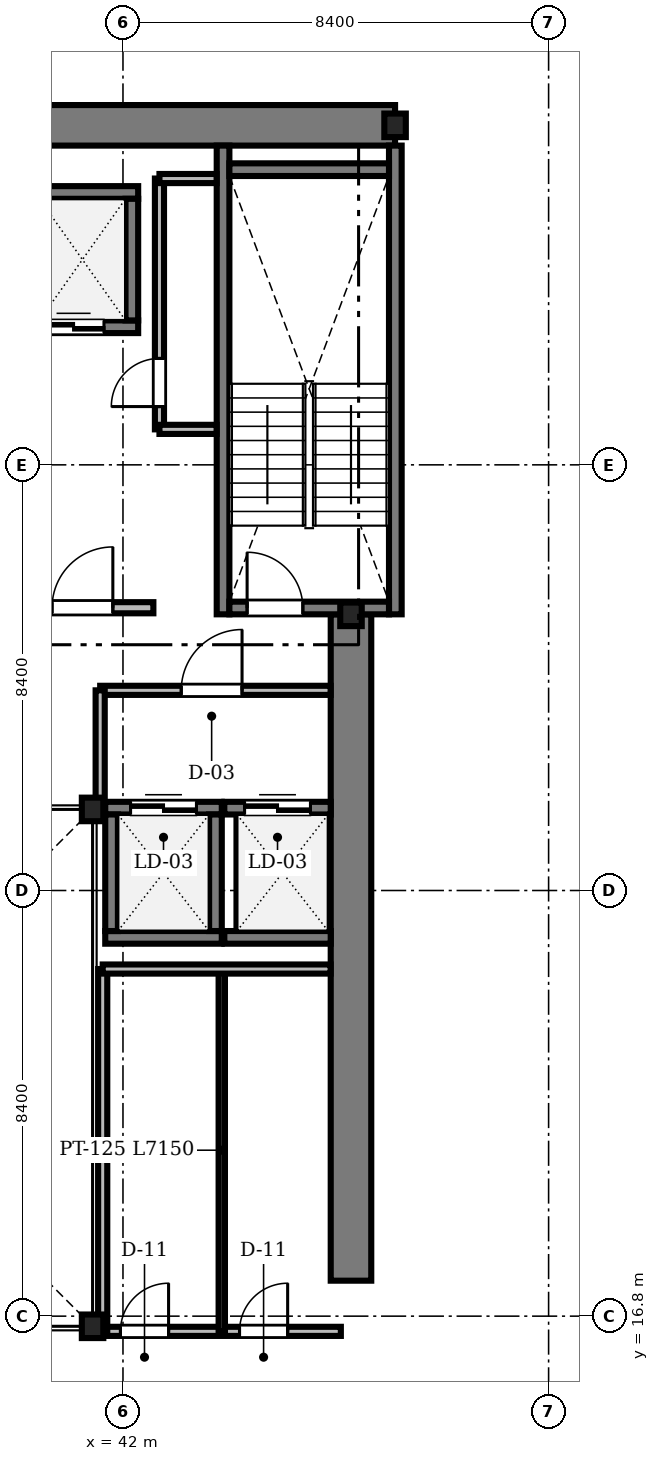
"""IFC4 building model, lengths in metres.
Left out: names, types, materials, properties, quantities, classifications, styles, units other than length and angle.
Written with IfcOpenShell. Run it as: python <this file> out.ifc"""

import sys

from ifc_helpers import new_model, si_unit, direction, frame, frame_2d, origin, origin_2d, place, context, subcontext, project, spatial, rectangle, i_section, extrude, source, transform, mapped, element, fill, save


model = new_model("IFC4")
c1 = context("Model", 3, precision=1e-05, world=origin(), true_north=direction((0.0, 1.0)))
c2 = subcontext(c1, "Body", "Model", "MODEL_VIEW")
j1 = project(units=[si_unit("LENGTHUNIT", "METRE"), si_unit("PLANEANGLEUNIT", "RADIAN")], contexts=[c1])
p1 = place(None, origin())
s1 = spatial("IfcSite", under=j1, at=p1, CompositionType="ELEMENT")
p2 = place(p1, origin())
s2 = spatial("IfcBuilding", under=s1, at=p2, CompositionType="ELEMENT")
p3 = place(p2, frame((0.0, 0.0, 122.4)))
s3 = spatial("IfcBuildingStorey", under=s2, at=p3, CompositionType="ELEMENT", Elevation=122.4)
m1 = source(origin(), c2, "Body", "SweptSolid", [
    extrude(rectangle(XDim=17.52, YDim=0.8, at=frame_2d((8.76, 0.0))), origin(), (0.0, 0.0, 1.0), 3.46),
])
p4 = place(p3, frame((29.85, 40.3, 0.0), z_axis=(0.0, 0.0, 1.0), x_axis=(1.0, 0.0, 0.0)))
e1 = element("IfcWall", 1, at=p4, inside=s3, PredefinedType="SHEAR", context=c2, shape_type="MappedRepresentation", body=[
    mapped(m1, transform((0.0, 0.0, 0.0), scale=1.0)),
])
m2 = source(origin(), c2, "Body", "SweptSolid", [
    extrude(rectangle(XDim=13.15, YDim=0.8, at=frame_2d((6.575, 0.0))), origin(), (0.0, 0.0, 1.0), 3.46),
])
p5 = place(p3, frame((46.5, 17.5, 0.0), z_axis=(0.0, 0.0, 1.0), x_axis=(0.0, 1.0, 0.0)))
e2 = element("IfcWall", 2, at=p5, inside=s3, PredefinedType="SHEAR", context=c2, shape_type="MappedRepresentation", body=[
    mapped(m2, transform((0.0, 0.0, 0.0), scale=1.0)),
])
m3 = source(origin(), c2, "Body", "SweptSolid", [
    extrude(i_section(OverallWidth=0.424, OverallDepth=0.465, WebThickness=0.035, FlangeThickness=0.056, FilletRadius=0.015, at=origin_2d()), origin(), (0.0, 0.0, 1.0), 3.46),
])
for number, where, z_axis, x_axis in (
    (3, (41.4, 16.6, 0.0), (0.0, 0.0, 1.0), (1.0, 0.0, 0.0)),
    (4, (41.4, 26.8, 0.0), (0.0, 0.0, 1.0), (1.0, 0.0, 0.0)),
    (5, (46.5, 30.65, 0.0), (0.0, 0.0, 1.0), (1.0, 0.0, 0.0)),
    (6, (47.37, 40.3, 0.0), (0.0, 0.0, 1.0), (1.0, 0.0, 0.0)),
):
    element("IfcColumn", number, at=place(p3, frame(where, z_axis=z_axis, x_axis=x_axis)), inside=s3, PredefinedType="COLUMN", context=c2, shape_type="MappedRepresentation", body=[
        mapped(m3, transform((0.0, 0.0, 0.0), scale=1.0)),
    ])
m4 = source(origin(), c2, "Body", "SweptSolid", [
    extrude(rectangle(XDim=9.25, YDim=0.25, at=frame_2d((4.625, 0.0))), origin(), (0.0, 0.0, 1.0), 3.5),
])
for number, where, z_axis, x_axis in (
    (7, (43.975, 30.65, 0.0), (0.0, 0.0, 1.0), (0.0, 1.0, 0.0)),
    (8, (47.375, 30.65, 0.0), (0.0, 0.0, 1.0), (0.0, 1.0, 0.0)),
):
    element("IfcWall", number, at=place(p3, frame(where, z_axis=z_axis, x_axis=x_axis)), inside=s3, PredefinedType="SOLIDWALL", context=c2, shape_type="MappedRepresentation", body=[
        mapped(m4, transform((0.0, 0.0, 0.0), scale=1.0)),
    ])
m5 = source(origin(), c2, "Body", "SweptSolid", [
    extrude(rectangle(XDim=3.15, YDim=0.25, at=frame_2d((1.575, 0.0))), origin(), (0.0, 0.0, 1.0), 3.5),
])
p6 = place(p3, frame((44.1, 39.425, 0.0), z_axis=(0.0, 0.0, 1.0), x_axis=(1.0, 0.0, 0.0)))
e9 = element("IfcWall", 9, at=p6, inside=s3, PredefinedType="SOLIDWALL", context=c2, shape_type="MappedRepresentation", body=[
    mapped(m5, transform((0.0, 0.0, 0.0), scale=1.0)),
])
p7 = place(p3, frame((44.1, 30.775, 0.0), z_axis=(0.0, 0.0, 1.0), x_axis=(1.0, 0.0, 0.0)))
e10 = element("IfcWall", 10, at=p7, inside=s3, PredefinedType="SOLIDWALL", context=c2, shape_type="MappedRepresentation", body=[
    mapped(m5, transform((0.0, 0.0, 0.0), scale=1.0)),
])
m6 = source(origin(), c2, "Body", "SweptSolid", [
    extrude(rectangle(XDim=1.1, YDim=2.2, at=frame_2d((0.55, 1.1))), frame((0.0, 0.135, 0.0), z_axis=(0.0, -1.0, 0.0), x_axis=(1.0, 0.0, 0.0)), (0.0, 0.0, 1.0), 0.27),
])
p8 = place(p7, frame((0.35, 0.0, 0.0)))
e11 = element("IfcOpeningElement", 11, at=p8, cuts=e10, PredefinedType="OPENING", context=c2, shape_type="MappedRepresentation", body=[
    mapped(m6, transform((0.0, 0.0, 0.0), scale=1.0)),
])
m7 = source(origin(), c2, "Body", "SweptSolid", [
    extrude(rectangle(XDim=2.8, YDim=0.22, at=frame_2d((1.4, 0.0))), origin(), (0.0, 0.0, 1.0), 3.46),
])
p9 = place(p3, frame((39.8, 30.78, 0.0), z_axis=(0.0, 0.0, 1.0), x_axis=(1.0, 0.0, 0.0)))
e12 = element("IfcWall", 12, at=p9, inside=s3, PredefinedType="SOLIDWALL", context=c2, shape_type="MappedRepresentation", body=[
    mapped(m7, transform((0.0, 0.0, 0.0), scale=1.0)),
])
m8 = source(origin(), c2, "Body", "SweptSolid", [
    extrude(rectangle(XDim=1.2, YDim=2.2, at=frame_2d((0.6, 1.1))), frame((0.0, 0.12, 0.0), z_axis=(0.0, -1.0, 0.0), x_axis=(1.0, 0.0, 0.0)), (0.0, 0.0, 1.0), 0.24),
])
p10 = place(p9, frame((0.8, 0.0, 0.0)))
e13 = element("IfcOpeningElement", 13, at=p10, cuts=e12, PredefinedType="OPENING", context=c2, shape_type="MappedRepresentation", body=[
    mapped(m8, transform((0.0, 0.0, 0.0), scale=1.0)),
])
m9 = source(origin(), c2, "Body", "SweptSolid", [
    extrude(rectangle(XDim=2.55, YDim=0.25, at=frame_2d((1.275, 0.0))), origin(), (0.0, 0.0, 1.0), 3.46),
])
p11 = place(p3, frame((39.75, 36.325, 0.0), z_axis=(0.0, 0.0, 1.0), x_axis=(1.0, 0.0, 0.0)))
e14 = element("IfcWall", 14, at=p11, inside=s3, PredefinedType="SOLIDWALL", context=c2, shape_type="MappedRepresentation", body=[
    mapped(m9, transform((0.0, 0.0, 0.0), scale=1.0)),
])
m10 = source(origin(), c2, "Body", "SweptSolid", [
    extrude(rectangle(XDim=1.2, YDim=2.25, at=frame_2d((0.6, 1.125))), frame((0.0, 0.135, 0.0), z_axis=(0.0, -1.0, 0.0), x_axis=(1.0, 0.0, 0.0)), (0.0, 0.0, 1.0), 0.27),
])
p12 = place(p11, frame((0.675, 0.0, 0.0)))
e15 = element("IfcOpeningElement", 15, at=p12, cuts=e14, PredefinedType="OPENING", context=c2, shape_type="MappedRepresentation", body=[
    mapped(m10, transform((0.0, 0.0, 0.0), scale=1.0)),
])
p13 = place(p3, frame((39.75, 38.975, 0.0), z_axis=(0.0, 0.0, 1.0), x_axis=(1.0, 0.0, 0.0)))
e16 = element("IfcWall", 16, at=p13, inside=s3, PredefinedType="SOLIDWALL", context=c2, shape_type="MappedRepresentation", body=[
    mapped(m9, transform((0.0, 0.0, 0.0), scale=1.0)),
])
m11 = source(origin(), c2, "Body", "SweptSolid", [
    extrude(rectangle(XDim=2.4, YDim=0.25, at=frame_2d((1.2, 0.0))), origin(), (0.0, 0.0, 1.0), 3.46),
])
p14 = place(p3, frame((42.175, 36.45, 0.0), z_axis=(0.0, 0.0, 1.0), x_axis=(0.0, 1.0, 0.0)))
e17 = element("IfcWall", 17, at=p14, inside=s3, PredefinedType="SOLIDWALL", context=c2, shape_type="MappedRepresentation", body=[
    mapped(m11, transform((0.0, 0.0, 0.0), scale=1.0)),
])
m12 = source(origin(), c2, "Body", "SweptSolid", [
    extrude(rectangle(XDim=2.3, YDim=0.25, at=frame_2d((1.15, 0.0))), origin(), (0.0, 0.0, 1.0), 3.46),
])
p15 = place(p3, frame((41.65, 24.275, 0.0), z_axis=(0.0, 0.0, 1.0), x_axis=(1.0, 0.0, 0.0)))
e18 = element("IfcWall", 18, at=p15, inside=s3, PredefinedType="SOLIDWALL", context=c2, shape_type="MappedRepresentation", body=[
    mapped(m12, transform((0.0, 0.0, 0.0), scale=1.0)),
])
p16 = place(p3, frame((41.65, 26.825, 0.0), z_axis=(0.0, 0.0, 1.0), x_axis=(1.0, 0.0, 0.0)))
e19 = element("IfcWall", 19, at=p16, inside=s3, PredefinedType="SOLIDWALL", context=c2, shape_type="MappedRepresentation", body=[
    mapped(m12, transform((0.0, 0.0, 0.0), scale=1.0)),
])
m13 = source(origin(), c2, "Body", "SweptSolid", [
    extrude(rectangle(XDim=1.3, YDim=2.3, at=frame_2d((0.65, 1.15))), frame((0.0, 0.135, 0.0), z_axis=(0.0, -1.0, 0.0), x_axis=(1.0, 0.0, 0.0)), (0.0, 0.0, 1.0), 0.27),
])
p17 = place(p16, frame((0.5, 0.0, 0.0)))
e20 = element("IfcOpeningElement", 20, at=p17, cuts=e19, PredefinedType="OPENING", context=c2, shape_type="MappedRepresentation", body=[
    mapped(m13, transform((0.0, 0.0, 0.0), scale=1.0)),
])
for number, where, z_axis, x_axis in (
    (21, (41.775, 24.4, 0.0), (0.0, 0.0, 1.0), (0.0, 1.0, 0.0)),
    (22, (43.825, 24.4, 0.0), (0.0, 0.0, 1.0), (0.0, 1.0, 0.0)),
):
    element("IfcWall", number, at=place(p3, frame(where, z_axis=z_axis, x_axis=x_axis)), inside=s3, PredefinedType="SOLIDWALL", context=c2, shape_type="MappedRepresentation", body=[
        mapped(m12, transform((0.0, 0.0, 0.0), scale=1.0)),
    ])
m14 = source(origin(), c2, "Body", "SweptSolid", [
    extrude(rectangle(XDim=2.1, YDim=0.25, at=frame_2d((1.05, 0.0))), origin(), (0.0, 0.0, 1.0), 3.46),
])
p18 = place(p3, frame((44.0, 24.275, 0.0), z_axis=(0.0, 0.0, 1.0), x_axis=(1.0, 0.0, 0.0)))
e23 = element("IfcWall", 23, at=p18, inside=s3, PredefinedType="SOLIDWALL", context=c2, shape_type="MappedRepresentation", body=[
    mapped(m14, transform((0.0, 0.0, 0.0), scale=1.0)),
])
p19 = place(p3, frame((44.0, 26.825, 0.0), z_axis=(0.0, 0.0, 1.0), x_axis=(1.0, 0.0, 0.0)))
e24 = element("IfcWall", 24, at=p19, inside=s3, PredefinedType="SOLIDWALL", context=c2, shape_type="MappedRepresentation", body=[
    mapped(m14, transform((0.0, 0.0, 0.0), scale=1.0)),
])
p20 = place(p19, frame((0.4, 0.0, 0.0)))
e25 = element("IfcOpeningElement", 25, at=p20, cuts=e24, PredefinedType="OPENING", context=c2, shape_type="MappedRepresentation", body=[
    mapped(m13, transform((0.0, 0.0, 0.0), scale=1.0)),
])
m15 = source(origin(), c2, "Body", "SweptSolid", [
    extrude(rectangle(XDim=4.95, YDim=0.18, at=frame_2d((2.475, 0.0))), origin(), (0.0, 0.0, 1.0), 3.46),
])
p21 = place(p3, frame((42.72, 34.3, 0.0), z_axis=(0.0, 0.0, 1.0), x_axis=(0.0, 1.0, 0.0)))
e26 = element("IfcWall", 26, at=p21, inside=s3, PredefinedType="PARTITIONING", context=c2, shape_type="MappedRepresentation", body=[
    mapped(m15, transform((0.0, 0.0, 0.0), scale=1.0)),
])
m16 = source(origin(), c2, "Body", "SweptSolid", [
    extrude(rectangle(XDim=0.95, YDim=2.15, at=frame_2d((0.475, 1.075))), frame((0.0, 0.1, 0.0), z_axis=(0.0, -1.0, 0.0), x_axis=(1.0, 0.0, 0.0)), (0.0, 0.0, 1.0), 0.2),
])
p22 = place(p21, frame((0.45, 0.0, 0.0)))
e27 = element("IfcOpeningElement", 27, at=p22, cuts=e26, PredefinedType="OPENING", context=c2, shape_type="MappedRepresentation", body=[
    mapped(m16, transform((0.0, 0.0, 0.0), scale=1.0)),
])
m17 = source(origin(), c2, "Body", "SweptSolid", [
    extrude(rectangle(XDim=4.548, YDim=0.18, at=frame_2d((2.274, 0.0))), origin(), (0.0, 0.0, 1.0), 3.092),
])
p23 = place(p3, frame((41.55, 29.15, 0.0), z_axis=(0.0, 0.0, 1.0), x_axis=(1.0, 0.0, 0.0)))
e28 = element("IfcWall", 28, at=p23, inside=s3, PredefinedType="PARTITIONING", context=c2, shape_type="MappedRepresentation", body=[
    mapped(m17, transform((0.0, 0.0, 0.0), scale=1.0)),
])
m18 = source(origin(), c2, "Body", "SweptSolid", [
    extrude(rectangle(XDim=1.2, YDim=2.2, at=frame_2d((0.6, 1.1))), frame((0.0, 0.1, 0.0), z_axis=(0.0, -1.0, 0.0), x_axis=(1.0, 0.0, 0.0)), (0.0, 0.0, 1.0), 0.2),
])
p24 = place(p23, frame((1.6, 0.0, 0.0)))
e29 = element("IfcOpeningElement", 29, at=p24, cuts=e28, PredefinedType="OPENING", context=c2, shape_type="MappedRepresentation", body=[
    mapped(m18, transform((0.0, 0.0, 0.0), scale=1.0)),
])
m19 = source(origin(), c2, "Body", "SweptSolid", [
    extrude(rectangle(XDim=4.7, YDim=0.18, at=frame_2d((2.35, 0.0))), origin(), (0.0, 0.0, 1.0), 2.852),
])
p25 = place(p3, frame((41.6, 16.5, 0.0), z_axis=(0.0, 0.0, 1.0), x_axis=(1.0, 0.0, 0.0)))
e30 = element("IfcWall", 30, at=p25, inside=s3, PredefinedType="PARTITIONING", context=c2, shape_type="MappedRepresentation", body=[
    mapped(m19, transform((0.0, 0.0, 0.0), scale=1.0)),
])
p26 = place(p25, frame((0.35, 0.0, 0.0)))
e31 = element("IfcOpeningElement", 31, at=p26, cuts=e30, PredefinedType="OPENING", context=c2, shape_type="MappedRepresentation", body=[
    mapped(m16, transform((0.0, 0.0, 0.0), scale=1.0)),
])
p27 = place(p25, frame((2.7, 0.0, 0.0)))
e32 = element("IfcOpeningElement", 32, at=p27, cuts=e30, PredefinedType="OPENING", context=c2, shape_type="MappedRepresentation", body=[
    mapped(m16, transform((0.0, 0.0, 0.0), scale=1.0)),
])
m20 = source(origin(), c2, "Body", "SweptSolid", [
    extrude(rectangle(XDim=7.15, YDim=0.18, at=frame_2d((3.575, 0.0))), origin(), (0.0, 0.0, 1.0), 2.852),
])
p28 = place(p3, frame((41.6, 16.5, 0.0), z_axis=(0.0, 0.0, 1.0), x_axis=(0.0, 1.0, 0.0)))
e33 = element("IfcWall", 33, at=p28, inside=s3, PredefinedType="PARTITIONING", context=c2, shape_type="MappedRepresentation", body=[
    mapped(m20, transform((0.0, 0.0, 0.0), scale=1.0)),
])
m21 = source(origin(), c2, "Body", "SweptSolid", [
    extrude(rectangle(XDim=7.15, YDim=0.125, at=frame_2d((3.575, 0.0))), origin(), (0.0, 0.0, 1.0), 2.852),
])
p29 = place(p3, frame((43.95, 16.5, 0.0), z_axis=(0.0, 0.0, 1.0), x_axis=(0.0, 1.0, 0.0)))
e34 = element("IfcWall", 34, at=p29, inside=s3, PredefinedType="PARTITIONING", context=c2, shape_type="MappedRepresentation", body=[
    mapped(m21, transform((0.0, 0.0, 0.0), scale=1.0)),
])
m22 = source(origin(), c2, "Body", "SweptSolid", [
    extrude(rectangle(XDim=4.498, YDim=0.18, at=frame_2d((2.249, 0.0))), origin(), (0.0, 0.0, 1.0), 3.46),
])
p30 = place(p3, frame((41.6, 23.65, 0.0), z_axis=(0.0, 0.0, 1.0), x_axis=(1.0, 0.0, 0.0)))
e35 = element("IfcWall", 35, at=p30, inside=s3, PredefinedType="PARTITIONING", context=c2, shape_type="MappedRepresentation", body=[
    mapped(m22, transform((0.0, 0.0, 0.0), scale=1.0)),
])
m23 = source(origin(), c2, "Body", "SweptSolid", [
    extrude(rectangle(XDim=2.35, YDim=0.18, at=frame_2d((1.175, 0.0))), origin(), (0.0, 0.0, 1.0), 2.852),
])
p31 = place(p3, frame((41.55, 26.8, 0.0), z_axis=(0.0, 0.0, 1.0), x_axis=(0.0, 1.0, 0.0)))
e36 = element("IfcWall", 36, at=p31, inside=s3, PredefinedType="PARTITIONING", context=c2, shape_type="MappedRepresentation", body=[
    mapped(m23, transform((0.0, 0.0, 0.0), scale=1.0)),
])
m24 = source(origin(), c2, "Body", "SweptSolid", [
    extrude(rectangle(XDim=1.128, YDim=0.18, at=frame_2d((0.564, 0.0))), origin(), (0.0, 0.0, 1.0), 3.46),
])
for number, where, z_axis, x_axis in (
    (37, (42.72, 34.3, 0.0), (0.0, 0.0, 1.0), (1.0, 0.0, 0.0)),
    (38, (42.72, 39.25, 0.0), (0.0, 0.0, 1.0), (1.0, 0.0, 0.0)),
):
    element("IfcWall", number, at=place(p3, frame(where, z_axis=z_axis, x_axis=x_axis)), inside=s3, PredefinedType="PARTITIONING", context=c2, shape_type="MappedRepresentation", body=[
        mapped(m24, transform((0.0, 0.0, 0.0), scale=1.0)),
    ])
m25 = source(origin(), c2, "Body", "SweptSolid", [
    extrude(rectangle(XDim=1.1, YDim=2.2, at=frame_2d((0.55, 1.1))), frame((0.0, 0.025, 0.0), z_axis=(0.0, -1.0, 0.0), x_axis=(1.0, 0.0, 0.0)), (0.0, 0.0, 1.0), 0.05),
])
p32 = place(p8, origin())
e39 = element("IfcDoor", 39, at=p32, inside=s3, OperationType="SINGLE_SWING_LEFT", PredefinedType="DOOR", context=c2, shape_type="MappedRepresentation", body=[
    mapped(m25, transform((0.0, 0.0, 0.0), scale=1.0)),
])
fill(e11, e39)
m26 = source(origin(), c2, "Body", "SweptSolid", [
    extrude(rectangle(XDim=1.2, YDim=2.2, at=frame_2d((0.6, 1.1))), frame((0.0, 0.025, 0.0), z_axis=(0.0, -1.0, 0.0), x_axis=(1.0, 0.0, 0.0)), (0.0, 0.0, 1.0), 0.05),
])
p33 = place(p10, origin())
e40 = element("IfcDoor", 40, at=p33, inside=s3, OperationType="SINGLE_SWING_RIGHT", PredefinedType="DOOR", context=c2, shape_type="MappedRepresentation", body=[
    mapped(m26, transform((0.0, 0.0, 0.0), scale=1.0)),
])
fill(e13, e40)
m27 = source(origin(), c2, "Body", "SweptSolid", [
    extrude(rectangle(XDim=1.2, YDim=2.25, at=frame_2d((0.6, 1.125))), frame((0.0, 0.025, 0.0), z_axis=(0.0, -1.0, 0.0), x_axis=(1.0, 0.0, 0.0)), (0.0, 0.0, 1.0), 0.05),
])
p34 = place(p12, origin())
e41 = element("IfcDoor", 41, at=p34, inside=s3, OperationType="DOUBLE_DOOR_SLIDING", PredefinedType="DOOR", context=c2, shape_type="MappedRepresentation", body=[
    mapped(m27, transform((0.0, 0.0, 0.0), scale=1.0)),
])
fill(e15, e41)
m28 = source(origin(), c2, "Body", "SweptSolid", [
    extrude(rectangle(XDim=1.3, YDim=2.3, at=frame_2d((0.65, 1.15))), frame((0.0, 0.025, 0.0), z_axis=(0.0, -1.0, 0.0), x_axis=(1.0, 0.0, 0.0)), (0.0, 0.0, 1.0), 0.05),
])
p35 = place(p17, origin())
e42 = element("IfcDoor", 42, at=p35, inside=s3, OperationType="DOUBLE_DOOR_SLIDING", PredefinedType="DOOR", context=c2, shape_type="MappedRepresentation", body=[
    mapped(m28, transform((0.0, 0.0, 0.0), scale=1.0)),
])
fill(e20, e42)
p36 = place(p20, origin())
e43 = element("IfcDoor", 43, at=p36, inside=s3, OperationType="DOUBLE_DOOR_SLIDING", PredefinedType="DOOR", context=c2, shape_type="MappedRepresentation", body=[
    mapped(m28, transform((0.0, 0.0, 0.0), scale=1.0)),
])
fill(e25, e43)
m29 = source(origin(), c2, "Body", "SweptSolid", [
    extrude(rectangle(XDim=0.95, YDim=2.15, at=frame_2d((0.475, 1.075))), frame((0.0, 0.025, 0.0), z_axis=(0.0, -1.0, 0.0), x_axis=(1.0, 0.0, 0.0)), (0.0, 0.0, 1.0), 0.05),
])
p37 = place(p22, origin())
e44 = element("IfcDoor", 44, at=p37, inside=s3, OperationType="SINGLE_SWING_LEFT", PredefinedType="DOOR", context=c2, shape_type="MappedRepresentation", body=[
    mapped(m29, transform((0.0, 0.0, 0.0), scale=1.0)),
])
fill(e27, e44)
p38 = place(p24, origin())
e45 = element("IfcDoor", 45, at=p38, inside=s3, OperationType="SINGLE_SWING_RIGHT", PredefinedType="DOOR", context=c2, shape_type="MappedRepresentation", body=[
    mapped(m26, transform((0.0, 0.0, 0.0), scale=1.0)),
])
fill(e29, e45)
p39 = place(p26, origin())
e46 = element("IfcDoor", 46, at=p39, inside=s3, OperationType="SINGLE_SWING_RIGHT", PredefinedType="DOOR", context=c2, shape_type="MappedRepresentation", body=[
    mapped(m29, transform((0.0, 0.0, 0.0), scale=1.0)),
])
fill(e31, e46)
p40 = place(p27, origin())
e47 = element("IfcDoor", 47, at=p40, inside=s3, OperationType="SINGLE_SWING_RIGHT", PredefinedType="DOOR", context=c2, shape_type="MappedRepresentation", body=[
    mapped(m29, transform((0.0, 0.0, 0.0), scale=1.0)),
])
fill(e32, e47)
save(model, sys.argv[1])
